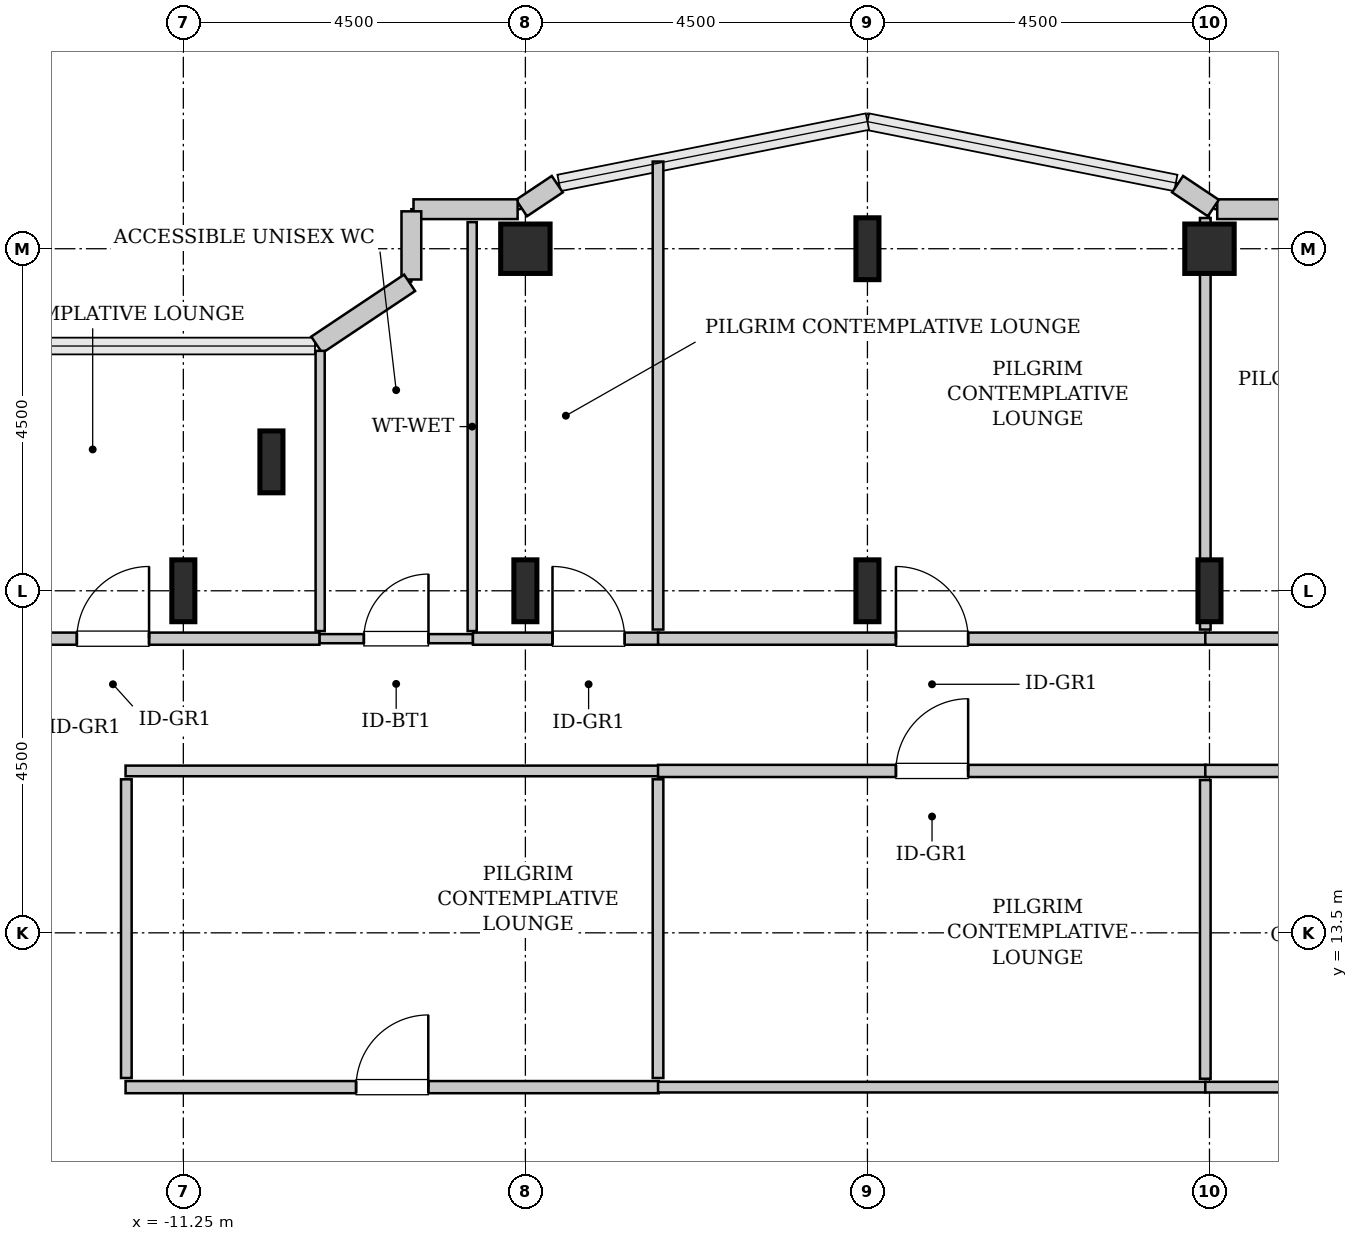
"""IFC4 building model, lengths in metres.
Left out: names, types, materials, properties, quantities, classifications, styles, units other than length and angle.
Written with IfcOpenShell. Run it as: python <this file> out.ifc"""

import sys

from ifc_helpers import new_model, si_unit, direction, frame, frame_2d, origin, origin_2d, place, context, subcontext, project, spatial, rectangle, hollow_rectangle, i_section, extrude, source, transform, mapped, element, fill, save


model = new_model("IFC4")
c1 = context("Model", 3, precision=1e-05, world=origin(), true_north=direction((0.0, 1.0)))
c2 = subcontext(c1, "Body", "Model", "MODEL_VIEW")
j1 = project(units=[si_unit("LENGTHUNIT", "METRE"), si_unit("PLANEANGLEUNIT", "RADIAN")], contexts=[c1])
p1 = place(None, origin())
s1 = spatial("IfcSite", under=j1, at=p1, CompositionType="ELEMENT")
p2 = place(p1, origin())
s2 = spatial("IfcBuilding", under=s1, at=p2, CompositionType="ELEMENT")
p3 = place(p2, frame((0.0, 0.0, 244.6)))
s3 = spatial("IfcBuildingStorey", under=s2, at=p3, CompositionType="ELEMENT", Elevation=244.6)
m1 = source(origin(), c2, "Body", "SweptSolid", [
    extrude(i_section(OverallWidth=0.303, OverallDepth=0.814, WebThickness=0.021, FlangeThickness=0.04, FilletRadius=0.03, at=origin_2d()), origin(), (0.0, 0.0, 1.0), 3.8),
])
for number, where, z_axis, x_axis in (
    (1, (-11.25, 18.0, 0.0), (0.0, 0.0, 1.0), (1.0, 0.0, 0.0)),
    (2, (-10.091, 19.696, 0.0), (0.0, 0.0, 1.0), (1.0, 0.0, 0.0)),
    (3, (-6.75, 18.0, 0.0), (0.0, 0.0, 1.0), (1.0, 0.0, 0.0)),
):
    element("IfcColumn", number, at=place(p3, frame(where, z_axis=z_axis, x_axis=x_axis)), inside=s3, PredefinedType="COLUMN", context=c2, shape_type="MappedRepresentation", body=[
        mapped(m1, transform((0.0, 0.0, 0.0), x_axis=(1.0, 0.0, 0.0), y_axis=(0.0, 1.0, 0.0), z_axis=(0.0, 0.0, 1.0), scale=1.0)),
    ])
m2 = source(origin(), c2, "Body", "SweptSolid", [
    extrude(hollow_rectangle(XDim=0.65, YDim=0.65, WallThickness=0.032, InnerFilletRadius=0.032, OuterFilletRadius=0.064, at=origin_2d()), origin(), (0.0, 0.0, 1.0), 3.8),
])
p4 = place(p3, frame((-6.75, 22.5, 0.0), z_axis=(0.0, 0.0, 1.0), x_axis=(1.0, 0.0, 0.0)))
e4 = element("IfcColumn", 4, at=p4, inside=s3, PredefinedType="COLUMN", context=c2, shape_type="MappedRepresentation", body=[
    mapped(m2, transform((0.0, 0.0, 0.0), x_axis=(1.0, 0.0, 0.0), y_axis=(0.0, 1.0, 0.0), z_axis=(0.0, 0.0, 1.0), scale=1.0)),
])
for number, where, z_axis, x_axis in (
    (5, (-2.25, 18.0, 0.0), (0.0, 0.0, 1.0), (1.0, 0.0, 0.0)),
    (6, (-2.25, 22.5, 0.0), (0.0, 0.0, 1.0), (1.0, 0.0, 0.0)),
    (7, (2.25, 18.0, 0.0), (0.0, 0.0, 1.0), (1.0, 0.0, 0.0)),
):
    element("IfcColumn", number, at=place(p3, frame(where, z_axis=z_axis, x_axis=x_axis)), inside=s3, PredefinedType="COLUMN", context=c2, shape_type="MappedRepresentation", body=[
        mapped(m1, transform((0.0, 0.0, 0.0), x_axis=(1.0, 0.0, 0.0), y_axis=(0.0, 1.0, 0.0), z_axis=(0.0, 0.0, 1.0), scale=1.0)),
    ])
p5 = place(p3, frame((2.25, 22.5, 0.0), z_axis=(0.0, 0.0, 1.0), x_axis=(1.0, 0.0, 0.0)))
e8 = element("IfcColumn", 8, at=p5, inside=s3, PredefinedType="COLUMN", context=c2, shape_type="MappedRepresentation", body=[
    mapped(m2, transform((0.0, 0.0, 0.0), x_axis=(1.0, 0.0, 0.0), y_axis=(0.0, 1.0, 0.0), z_axis=(0.0, 0.0, 1.0), scale=1.0)),
])
m3 = source(origin(), c2, "Body", "SweptSolid", [
    extrude(rectangle(XDim=1.37, YDim=0.26, at=frame_2d((0.685, 0.0))), origin(), (0.0, 0.0, 1.0), 3.55),
])
p6 = place(p3, frame((3.722, 23.02, 0.0), z_axis=(0.0, 0.0, 1.0), x_axis=(-1.0, 0.0, 0.0)))
e9 = element("IfcWall", 9, at=p6, inside=s3, PredefinedType="SOLIDWALL", context=c2, shape_type="MappedRepresentation", body=[
    mapped(m3, transform((0.0, 0.0, 0.0), x_axis=(1.0, 0.0, 0.0), y_axis=(0.0, 1.0, 0.0), z_axis=(0.0, 0.0, 1.0), scale=1.0)),
])
m4 = source(origin(), c2, "Body", "SweptSolid", [
    extrude(rectangle(XDim=0.565, YDim=0.26, at=frame_2d((0.283, 0.0))), origin(), (0.0, 0.0, 1.0), 3.55),
])
for number, where, z_axis, x_axis in (
    (10, (2.301, 23.036, 0.0), (0.0, 0.0, 1.0), (-0.832, 0.555, 0.0)),
    (11, (-6.331, 23.35, 0.0), (0.0, 0.0, 1.0), (-0.832, -0.555, 0.0)),
):
    element("IfcWall", number, at=place(p3, frame(where, z_axis=z_axis, x_axis=x_axis)), inside=s3, PredefinedType="SOLIDWALL", context=c2, shape_type="MappedRepresentation", body=[
        mapped(m4, transform((0.0, 0.0, 0.0), x_axis=(1.0, 0.0, 0.0), y_axis=(0.0, 1.0, 0.0), z_axis=(0.0, 0.0, 1.0), scale=1.0)),
    ])
p7 = place(p3, frame((-6.852, 23.02, 0.0), z_axis=(0.0, 0.0, 1.0), x_axis=(-1.0, 0.0, 0.0)))
e12 = element("IfcWall", 12, at=p7, inside=s3, PredefinedType="SOLIDWALL", context=c2, shape_type="MappedRepresentation", body=[
    mapped(m3, transform((0.0, 0.0, 0.0), x_axis=(1.0, 0.0, 0.0), y_axis=(0.0, 1.0, 0.0), z_axis=(0.0, 0.0, 1.0), scale=1.0)),
])
m5 = source(origin(), c2, "Body", "SweptSolid", [
    extrude(rectangle(XDim=0.897, YDim=0.26, at=frame_2d((0.448, 0.0))), origin(), (0.0, 0.0, 1.0), 3.55),
])
p8 = place(p3, frame((-8.25, 22.992, 0.0), z_axis=(0.0, 0.0, 1.0), x_axis=(0.0, -1.0, 0.0)))
e13 = element("IfcWall", 13, at=p8, inside=s3, PredefinedType="SOLIDWALL", context=c2, shape_type="MappedRepresentation", body=[
    mapped(m5, transform((0.0, 0.0, 0.0), x_axis=(1.0, 0.0, 0.0), y_axis=(0.0, 1.0, 0.0), z_axis=(0.0, 0.0, 1.0), scale=1.0)),
])
m6 = source(origin(), c2, "Body", "SweptSolid", [
    extrude(rectangle(XDim=1.469, YDim=0.26, at=frame_2d((0.734, 0.0))), origin(), (0.0, 0.0, 1.0), 3.55),
])
p9 = place(p3, frame((-8.273, 22.052, 0.0), z_axis=(0.0, 0.0, 1.0), x_axis=(-0.831461760506, -0.555581983884, 0.0)))
e14 = element("IfcWall", 14, at=p9, inside=s3, PredefinedType="SOLIDWALL", context=c2, shape_type="MappedRepresentation", body=[
    mapped(m6, transform((0.0, 0.0, 0.0), x_axis=(1.0, 0.0, 0.0), y_axis=(0.0, 1.0, 0.0), z_axis=(0.0, 0.0, 1.0), scale=1.0)),
])
m7 = source(origin(), c2, "Body", "SweptSolid", [
    extrude(rectangle(XDim=2.02, YDim=0.12, at=frame_2d((1.01, 0.0))), origin(), (0.0, 0.0, 1.0), 3.535),
])
p10 = place(p3, frame((-9.46, 17.37, 0.0), z_axis=(0.0, 0.0, 1.0), x_axis=(1.0, 0.0, 0.0)))
e15 = element("IfcWall", 15, at=p10, inside=s3, PredefinedType="PLUMBINGWALL", context=c2, shape_type="MappedRepresentation", body=[
    mapped(m7, transform((0.0, 0.0, 0.0), x_axis=(1.0, 0.0, 0.0), y_axis=(0.0, 1.0, 0.0), z_axis=(0.0, 0.0, 1.0), scale=1.0)),
])
p11 = place(p10, frame((0.585, 0.0, 0.0)))
e16 = element("IfcOpeningElement", 16, at=p11, cuts=e15, PredefinedType="OPENING", context=c2, shape_type="SweptSolid", body=[
    extrude(rectangle(XDim=0.85, YDim=2.1, at=frame_2d((0.425, 1.05))), frame((0.0, 0.07, 0.0), z_axis=(0.0, -1.0, 0.0), x_axis=(1.0, 0.0, 0.0)), (0.0, 0.0, 1.0), 0.14),
])
m8 = source(origin(), c2, "Body", "SweptSolid", [
    extrude(rectangle(XDim=5.38, YDim=0.12, at=frame_2d((2.69, 0.0))), origin(), (0.0, 0.0, 1.0), 3.535),
])
p12 = place(p3, frame((-7.45, 17.47, 0.0), z_axis=(0.0, 0.0, 1.0), x_axis=(0.0, 1.0, 0.0)))
e17 = element("IfcWall", 17, at=p12, inside=s3, PredefinedType="PLUMBINGWALL", context=c2, shape_type="MappedRepresentation", body=[
    mapped(m8, transform((0.0, 0.0, 0.0), x_axis=(1.0, 0.0, 0.0), y_axis=(0.0, 1.0, 0.0), z_axis=(0.0, 0.0, 1.0), scale=1.0)),
])
m9 = source(origin(), c2, "Body", "SweptSolid", [
    extrude(rectangle(XDim=3.687, YDim=0.12, at=frame_2d((1.843, 0.0))), origin(), (0.0, 0.0, 1.0), 3.535),
])
p13 = place(p3, frame((-9.45, 17.47, 0.0), z_axis=(0.0, 0.0, 1.0), x_axis=(0.0, 1.0, 0.0)))
e18 = element("IfcWall", 18, at=p13, inside=s3, PredefinedType="PLUMBINGWALL", context=c2, shape_type="MappedRepresentation", body=[
    mapped(m9, transform((0.0, 0.0, 0.0), x_axis=(1.0, 0.0, 0.0), y_axis=(0.0, 1.0, 0.0), z_axis=(0.0, 0.0, 1.0), scale=1.0)),
])
m10 = source(origin(), c2, "Body", "SweptSolid", [
    extrude(rectangle(XDim=7.015, YDim=0.16, at=frame_2d((3.507, 0.0))), origin(), (0.0, 0.0, 1.0), 3.535),
])
p14 = place(p3, frame((-12.01, 11.47, 0.0), z_axis=(0.0, 0.0, 1.0), x_axis=(1.0, 0.0, 0.0)))
e19 = element("IfcWall", 19, at=p14, inside=s3, PredefinedType="PARTITIONING", context=c2, shape_type="MappedRepresentation", body=[
    mapped(m10, transform((0.0, 0.0, 0.0), x_axis=(1.0, 0.0, 0.0), y_axis=(0.0, 1.0, 0.0), z_axis=(0.0, 0.0, 1.0), scale=1.0)),
])
p15 = place(p14, frame((3.032, 0.0, 0.0)))
e20 = element("IfcOpeningElement", 20, at=p15, cuts=e19, PredefinedType="OPENING", context=c2, shape_type="SweptSolid", body=[
    extrude(rectangle(XDim=0.95, YDim=2.1, at=frame_2d((0.475, 1.05))), frame((0.0, 0.09, 0.0), z_axis=(0.0, -1.0, 0.0), x_axis=(1.0, 0.0, 0.0)), (0.0, 0.0, 1.0), 0.18),
])
m11 = source(origin(), c2, "Body", "SweptSolid", [
    extrude(rectangle(XDim=7.015, YDim=0.14, at=frame_2d((3.507, 0.0))), origin(), (0.0, 0.0, 1.0), 3.535),
])
p16 = place(p3, frame((-12.01, 15.63, 0.0), z_axis=(0.0, 0.0, 1.0), x_axis=(1.0, 0.0, 0.0)))
e21 = element("IfcWall", 21, at=p16, inside=s3, PredefinedType="PARTITIONING", context=c2, shape_type="MappedRepresentation", body=[
    mapped(m11, transform((0.0, 0.0, 0.0), x_axis=(1.0, 0.0, 0.0), y_axis=(0.0, 1.0, 0.0), z_axis=(0.0, 0.0, 1.0), scale=1.0)),
])
m12 = source(origin(), c2, "Body", "SweptSolid", [
    extrude(rectangle(XDim=3.93, YDim=0.14, at=frame_2d((1.965, 0.0))), origin(), (0.0, 0.0, 1.0), 3.535),
])
for number, where, z_axis, x_axis in (
    (22, (-12.0, 11.59, 0.0), (0.0, 0.0, 1.0), (0.0, 1.0, 0.0)),
    (23, (-5.005, 11.59, 0.0), (0.0, 0.0, 1.0), (0.0, 1.0, 0.0)),
):
    element("IfcWall", number, at=place(p3, frame(where, z_axis=z_axis, x_axis=x_axis)), inside=s3, PredefinedType="PARTITIONING", context=c2, shape_type="MappedRepresentation", body=[
        mapped(m12, transform((0.0, 0.0, 0.0), x_axis=(1.0, 0.0, 0.0), y_axis=(0.0, 1.0, 0.0), z_axis=(0.0, 0.0, 1.0), scale=1.0)),
    ])
m13 = source(origin(), c2, "Body", "SweptSolid", [
    extrude(rectangle(XDim=2.445, YDim=0.16, at=frame_2d((1.222, 0.0))), origin(), (0.0, 0.0, 1.0), 3.535),
])
p17 = place(p3, frame((-7.44, 17.37, 0.0), z_axis=(0.0, 0.0, 1.0), x_axis=(1.0, 0.0, 0.0)))
e24 = element("IfcWall", 24, at=p17, inside=s3, PredefinedType="PARTITIONING", context=c2, shape_type="MappedRepresentation", body=[
    mapped(m13, transform((0.0, 0.0, 0.0), x_axis=(1.0, 0.0, 0.0), y_axis=(0.0, 1.0, 0.0), z_axis=(0.0, 0.0, 1.0), scale=1.0)),
])
p18 = place(p17, frame((1.047, 0.0, 0.0)))
e25 = element("IfcOpeningElement", 25, at=p18, cuts=e24, PredefinedType="OPENING", context=c2, shape_type="SweptSolid", body=[
    extrude(rectangle(XDim=0.95, YDim=2.1, at=frame_2d((0.475, 1.05))), frame((0.0, 0.09, 0.0), z_axis=(0.0, -1.0, 0.0), x_axis=(1.0, 0.0, 0.0)), (0.0, 0.0, 1.0), 0.18),
])
m14 = source(origin(), c2, "Body", "SweptSolid", [
    extrude(rectangle(XDim=6.157, YDim=0.14, at=frame_2d((3.078, 0.0))), origin(), (0.0, 0.0, 1.0), 3.535),
])
p19 = place(p3, frame((-5.005, 17.49, 0.0), z_axis=(0.0, 0.0, 1.0), x_axis=(0.0, 1.0, 0.0)))
e26 = element("IfcWall", 26, at=p19, inside=s3, PredefinedType="PARTITIONING", context=c2, shape_type="MappedRepresentation", body=[
    mapped(m14, transform((0.0, 0.0, 0.0), x_axis=(1.0, 0.0, 0.0), y_axis=(0.0, 1.0, 0.0), z_axis=(0.0, 0.0, 1.0), scale=1.0)),
])
m15 = source(origin(), c2, "Body", "SweptSolid", [
    extrude(rectangle(XDim=4.16, YDim=0.16, at=frame_2d((2.08, 0.0))), origin(), (0.0, 0.0, 1.0), 3.535),
])
p20 = place(p3, frame((-13.62, 17.37, 0.0), z_axis=(0.0, 0.0, 1.0), x_axis=(1.0, 0.0, 0.0)))
e27 = element("IfcWall", 27, at=p20, inside=s3, PredefinedType="PARTITIONING", context=c2, shape_type="MappedRepresentation", body=[
    mapped(m15, transform((0.0, 0.0, 0.0), x_axis=(1.0, 0.0, 0.0), y_axis=(0.0, 1.0, 0.0), z_axis=(0.0, 0.0, 1.0), scale=1.0)),
])
p21 = place(p20, frame((0.969, 0.0, 0.0)))
e28 = element("IfcOpeningElement", 28, at=p21, cuts=e27, PredefinedType="OPENING", context=c2, shape_type="SweptSolid", body=[
    extrude(rectangle(XDim=0.95, YDim=2.1, at=frame_2d((0.475, 1.05))), frame((0.0, 0.09, 0.0), z_axis=(0.0, -1.0, 0.0), x_axis=(1.0, 0.0, 0.0)), (0.0, 0.0, 1.0), 0.18),
])
m16 = source(origin(), c2, "Body", "SweptSolid", [
    extrude(rectangle(XDim=7.21, YDim=0.16, at=frame_2d((3.605, 0.0))), origin(), (0.0, 0.0, 1.0), 3.535),
])
p22 = place(p3, frame((-5.005, 17.37, 0.0), z_axis=(0.0, 0.0, 1.0), x_axis=(1.0, 0.0, 0.0)))
e29 = element("IfcWall", 29, at=p22, inside=s3, PredefinedType="PARTITIONING", context=c2, shape_type="MappedRepresentation", body=[
    mapped(m16, transform((0.0, 0.0, 0.0), x_axis=(1.0, 0.0, 0.0), y_axis=(0.0, 1.0, 0.0), z_axis=(0.0, 0.0, 1.0), scale=1.0)),
])
p23 = place(p22, frame((3.13, 0.0, 0.0)))
e30 = element("IfcOpeningElement", 30, at=p23, cuts=e29, PredefinedType="OPENING", context=c2, shape_type="SweptSolid", body=[
    extrude(rectangle(XDim=0.95, YDim=2.1, at=frame_2d((0.475, 1.05))), frame((0.0, 0.09, 0.0), z_axis=(0.0, -1.0, 0.0), x_axis=(1.0, 0.0, 0.0)), (0.0, 0.0, 1.0), 0.18),
])
m17 = source(origin(), c2, "Body", "SweptSolid", [
    extrude(rectangle(XDim=5.414, YDim=0.14, at=frame_2d((2.707, 0.0))), origin(), (0.0, 0.0, 1.0), 2.925),
])
p24 = place(p3, frame((2.195, 17.49, 0.0), z_axis=(0.0, 0.0, 1.0), x_axis=(0.0, 1.0, 0.0)))
e31 = element("IfcWall", 31, at=p24, inside=s3, PredefinedType="PARTITIONING", context=c2, shape_type="MappedRepresentation", body=[
    mapped(m17, transform((0.0, 0.0, 0.0), x_axis=(1.0, 0.0, 0.0), y_axis=(0.0, 1.0, 0.0), z_axis=(0.0, 0.0, 1.0), scale=1.0)),
])
p25 = place(p3, frame((-5.005, 15.63, 0.0), z_axis=(0.0, 0.0, 1.0), x_axis=(1.0, 0.0, 0.0)))
e32 = element("IfcWall", 32, at=p25, inside=s3, PredefinedType="PARTITIONING", context=c2, shape_type="MappedRepresentation", body=[
    mapped(m16, transform((0.0, 0.0, 0.0), x_axis=(1.0, 0.0, 0.0), y_axis=(0.0, 1.0, 0.0), z_axis=(0.0, 0.0, 1.0), scale=1.0)),
])
p26 = place(p25, frame((3.13, 0.0, 0.0)))
e33 = element("IfcOpeningElement", 33, at=p26, cuts=e32, PredefinedType="OPENING", context=c2, shape_type="SweptSolid", body=[
    extrude(rectangle(XDim=0.95, YDim=2.1, at=frame_2d((0.475, 1.05))), frame((0.0, 0.09, 0.0), z_axis=(0.0, -1.0, 0.0), x_axis=(1.0, 0.0, 0.0)), (0.0, 0.0, 1.0), 0.18),
])
m18 = source(origin(), c2, "Body", "SweptSolid", [
    extrude(rectangle(XDim=7.21, YDim=0.14, at=frame_2d((3.605, 0.0))), origin(), (0.0, 0.0, 1.0), 3.535),
])
p27 = place(p3, frame((-5.005, 11.47, 0.0), z_axis=(0.0, 0.0, 1.0), x_axis=(1.0, 0.0, 0.0)))
e34 = element("IfcWall", 34, at=p27, inside=s3, PredefinedType="PARTITIONING", context=c2, shape_type="MappedRepresentation", body=[
    mapped(m18, transform((0.0, 0.0, 0.0), x_axis=(1.0, 0.0, 0.0), y_axis=(0.0, 1.0, 0.0), z_axis=(0.0, 0.0, 1.0), scale=1.0)),
])
p28 = place(p3, frame((2.195, 11.58, 0.0), z_axis=(0.0, 0.0, 1.0), x_axis=(0.0, 1.0, 0.0)))
e35 = element("IfcWall", 35, at=p28, inside=s3, PredefinedType="PARTITIONING", context=c2, shape_type="MappedRepresentation", body=[
    mapped(m12, transform((0.0, 0.0, 0.0), x_axis=(1.0, 0.0, 0.0), y_axis=(0.0, 1.0, 0.0), z_axis=(0.0, 0.0, 1.0), scale=1.0)),
])
m19 = source(origin(), c2, "Body", "SweptSolid", [
    extrude(rectangle(XDim=6.21, YDim=0.16, at=frame_2d((3.105, 0.0))), origin(), (0.0, 0.0, 1.0), 3.535),
])
p29 = place(p3, frame((2.195, 17.37, 0.0), z_axis=(0.0, 0.0, 1.0), x_axis=(1.0, 0.0, 0.0)))
e36 = element("IfcWall", 36, at=p29, inside=s3, PredefinedType="PARTITIONING", context=c2, shape_type="MappedRepresentation", body=[
    mapped(m19, transform((0.0, 0.0, 0.0), x_axis=(1.0, 0.0, 0.0), y_axis=(0.0, 1.0, 0.0), z_axis=(0.0, 0.0, 1.0), scale=1.0)),
])
p30 = place(p29, frame((2.63, 0.0, 0.0)))
e37 = element("IfcOpeningElement", 37, at=p30, cuts=e36, PredefinedType="OPENING", context=c2, shape_type="SweptSolid", body=[
    extrude(rectangle(XDim=0.95, YDim=2.1, at=frame_2d((0.475, 1.05))), frame((0.0, 0.09, 0.0), z_axis=(0.0, -1.0, 0.0), x_axis=(1.0, 0.0, 0.0)), (0.0, 0.0, 1.0), 0.18),
])
p31 = place(p3, frame((2.195, 15.63, 0.0), z_axis=(0.0, 0.0, 1.0), x_axis=(1.0, 0.0, 0.0)))
e38 = element("IfcWall", 38, at=p31, inside=s3, PredefinedType="PARTITIONING", context=c2, shape_type="MappedRepresentation", body=[
    mapped(m19, transform((0.0, 0.0, 0.0), x_axis=(1.0, 0.0, 0.0), y_axis=(0.0, 1.0, 0.0), z_axis=(0.0, 0.0, 1.0), scale=1.0)),
])
p32 = place(p31, frame((2.63, 0.0, 0.0)))
e39 = element("IfcOpeningElement", 39, at=p32, cuts=e38, PredefinedType="OPENING", context=c2, shape_type="SweptSolid", body=[
    extrude(rectangle(XDim=0.95, YDim=2.1, at=frame_2d((0.475, 1.05))), frame((0.0, 0.09, 0.0), z_axis=(0.0, -1.0, 0.0), x_axis=(1.0, 0.0, 0.0)), (0.0, 0.0, 1.0), 0.18),
])
m20 = source(origin(), c2, "Body", "SweptSolid", [
    extrude(rectangle(XDim=6.21, YDim=0.14, at=frame_2d((3.105, 0.0))), origin(), (0.0, 0.0, 1.0), 3.535),
])
p33 = place(p3, frame((2.195, 11.47, 0.0), z_axis=(0.0, 0.0, 1.0), x_axis=(1.0, 0.0, 0.0)))
e40 = element("IfcWall", 40, at=p33, inside=s3, PredefinedType="PARTITIONING", context=c2, shape_type="MappedRepresentation", body=[
    mapped(m20, transform((0.0, 0.0, 0.0), x_axis=(1.0, 0.0, 0.0), y_axis=(0.0, 1.0, 0.0), z_axis=(0.0, 0.0, 1.0), scale=1.0)),
])
m21 = source(origin(), c2, "Body", "SweptSolid", [
    extrude(rectangle(XDim=0.85, YDim=2.1, at=frame_2d((0.425, 1.05))), frame((0.0, 0.025, 0.0), z_axis=(0.0, -1.0, 0.0), x_axis=(1.0, 0.0, 0.0)), (0.0, 0.0, 1.0), 0.05),
])
p34 = place(p11, origin())
e41 = element("IfcDoor", 41, at=p34, inside=s3, OperationType="SINGLE_SWING_RIGHT", PredefinedType="DOOR", context=c2, shape_type="MappedRepresentation", body=[
    mapped(m21, transform((0.0, 0.0, 0.0), x_axis=(1.0, 0.0, 0.0), y_axis=(0.0, 1.0, 0.0), z_axis=(0.0, 0.0, 1.0), scale=1.0)),
])
fill(e16, e41)
m22 = source(origin(), c2, "Body", "SweptSolid", [
    extrude(rectangle(XDim=0.95, YDim=2.1, at=frame_2d((0.475, 1.05))), frame((0.0, 0.025, 0.0), z_axis=(0.0, -1.0, 0.0), x_axis=(1.0, 0.0, 0.0)), (0.0, 0.0, 1.0), 0.05),
])
p35 = place(p15, origin())
e42 = element("IfcDoor", 42, at=p35, inside=s3, OperationType="SINGLE_SWING_RIGHT", PredefinedType="DOOR", context=c2, shape_type="MappedRepresentation", body=[
    mapped(m22, transform((0.0, 0.0, 0.0), x_axis=(1.0, 0.0, 0.0), y_axis=(0.0, 1.0, 0.0), z_axis=(0.0, 0.0, 1.0), scale=1.0)),
])
fill(e20, e42)
p36 = place(p18, origin())
e43 = element("IfcDoor", 43, at=p36, inside=s3, OperationType="SINGLE_SWING_LEFT", PredefinedType="DOOR", context=c2, shape_type="MappedRepresentation", body=[
    mapped(m22, transform((0.0, 0.0, 0.0), x_axis=(1.0, 0.0, 0.0), y_axis=(0.0, 1.0, 0.0), z_axis=(0.0, 0.0, 1.0), scale=1.0)),
])
fill(e25, e43)
p37 = place(p21, origin())
e44 = element("IfcDoor", 44, at=p37, inside=s3, OperationType="SINGLE_SWING_RIGHT", PredefinedType="DOOR", context=c2, shape_type="MappedRepresentation", body=[
    mapped(m22, transform((0.0, 0.0, 0.0), x_axis=(1.0, 0.0, 0.0), y_axis=(0.0, 1.0, 0.0), z_axis=(0.0, 0.0, 1.0), scale=1.0)),
])
fill(e28, e44)
p38 = place(p23, origin())
e45 = element("IfcDoor", 45, at=p38, inside=s3, OperationType="SINGLE_SWING_LEFT", PredefinedType="DOOR", context=c2, shape_type="MappedRepresentation", body=[
    mapped(m22, transform((0.0, 0.0, 0.0), x_axis=(1.0, 0.0, 0.0), y_axis=(0.0, 1.0, 0.0), z_axis=(0.0, 0.0, 1.0), scale=1.0)),
])
fill(e30, e45)
p39 = place(p26, origin())
e46 = element("IfcDoor", 46, at=p39, inside=s3, OperationType="SINGLE_SWING_RIGHT", PredefinedType="DOOR", context=c2, shape_type="MappedRepresentation", body=[
    mapped(m22, transform((0.0, 0.0, 0.0), x_axis=(1.0, 0.0, 0.0), y_axis=(0.0, 1.0, 0.0), z_axis=(0.0, 0.0, 1.0), scale=1.0)),
])
fill(e33, e46)
save(model, sys.argv[1])
